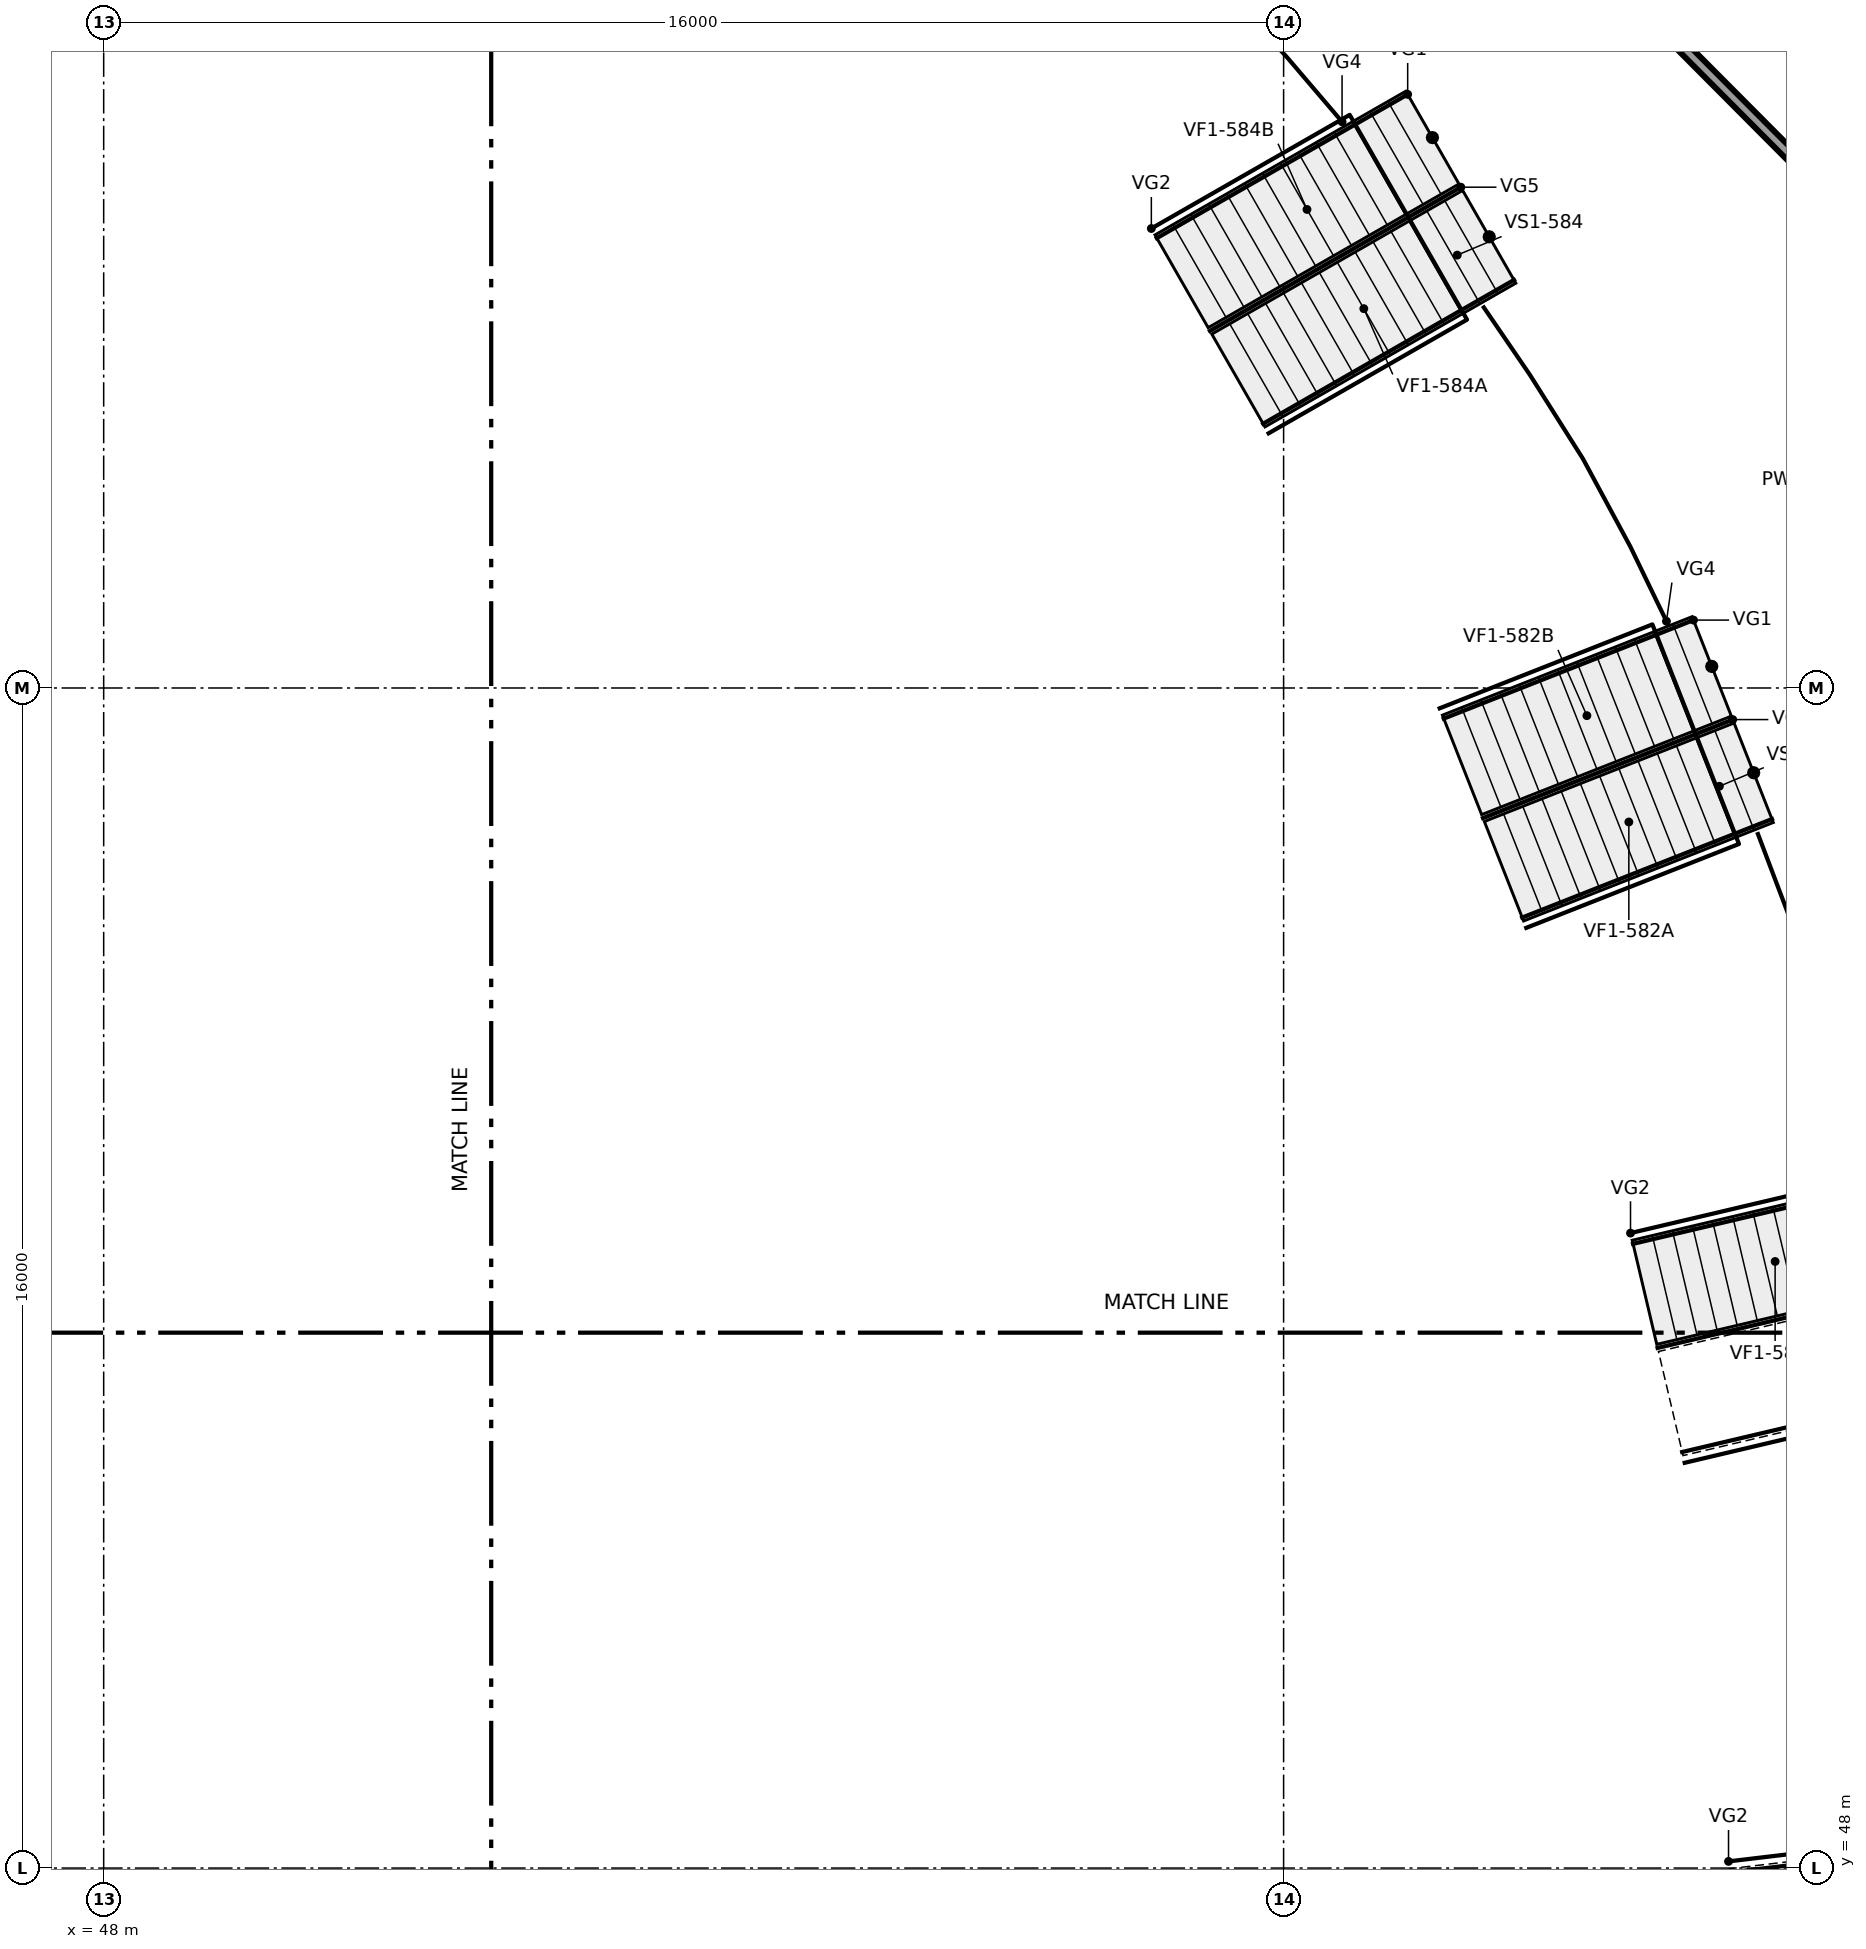
"""IFC4 building model, lengths in metres.
Left out: names, types, materials, properties, quantities, classifications, styles, units other than length and angle.
Written with IfcOpenShell. Run it as: python <this file> out.ifc"""

import sys

from ifc_helpers import new_model, si_unit, direction, frame, frame_2d, origin, origin_2d, place, context, subcontext, project, spatial, rectangle, circle, extrude, element, save


model = new_model("IFC4")
c1 = context("Model", 3, precision=1e-05, world=origin(), true_north=direction((0.0, 1.0)))
c2 = subcontext(c1, "Body", "Model", "MODEL_VIEW")
j1 = project(units=[si_unit("LENGTHUNIT", "METRE"), si_unit("PLANEANGLEUNIT", "RADIAN")], contexts=[c1])
p1 = place(None, origin())
s1 = spatial("IfcSite", under=j1, at=p1, CompositionType="ELEMENT")
p2 = place(p1, origin())
s2 = spatial("IfcBuilding", under=s1, at=p2, CompositionType="ELEMENT")
p3 = place(p2, frame((0.0, 0.0, 18.0)))
s3 = spatial("IfcBuildingStorey", under=s2, at=p3, CompositionType="ELEMENT", Elevation=18.0)
p4 = place(p3, frame((71.17, 59.677, 0.0), z_axis=(0.0, 0.0, 1.0), x_axis=(1.0, 0.0, 0.0)))
e1 = element("IfcColumn", 1, at=p4, inside=s3, PredefinedType="COLUMN", context=c2, shape_type="SweptSolid", body=[
    extrude(circle(Radius=0.45, at=origin_2d()), origin(), (0.0, 0.0, 1.0), 3.698),
])
p5 = place(p3, frame((67.972, 67.058, 0.0), z_axis=(0.0, 0.0, 1.0), x_axis=(1.0, 0.0, 0.0)))
e2 = element("IfcColumn", 2, at=p5, inside=s3, PredefinedType="COLUMN", context=c2, shape_type="SweptSolid", body=[
    extrude(circle(Radius=0.45, at=origin_2d()), origin(), (0.0, 0.0, 1.0), 3.954),
])
p6 = place(p3, frame((64.152, 77.974, 0.0), z_axis=(0.0, 0.0, 1.0), x_axis=(0.705496399325, -0.70871350385, 0.0)))
e3 = element("IfcWall", 3, at=p6, inside=s3, PredefinedType="PARTITIONING", context=c2, shape_type="SweptSolid", body=[
    extrude(rectangle(XDim=13.356, YDim=0.15, at=frame_2d((6.678, 0.0))), origin(), (0.0, 0.0, 1.0), 5.6),
])
p7 = place(p6, frame((4.85, 0.0, 0.0)))
e4 = element("IfcOpeningElement", 4, at=p7, cuts=e3, PredefinedType="OPENING", context=c2, shape_type="SweptSolid", body=[
    extrude(rectangle(XDim=1.8, YDim=2.1, at=frame_2d((0.9, 1.05))), frame((0.0, 0.085, 0.0), z_axis=(0.0, -1.0, 0.0), x_axis=(1.0, 0.0, 0.0)), (0.0, 0.0, 1.0), 0.17),
])
p8 = place(p6, frame((11.45, 0.0, 0.0)))
e5 = element("IfcOpeningElement", 5, at=p8, cuts=e3, PredefinedType="OPENING", context=c2, shape_type="SweptSolid", body=[
    extrude(rectangle(XDim=1.8, YDim=2.1, at=frame_2d((0.9, 1.05))), frame((0.0, 0.085, 0.0), z_axis=(0.0, -1.0, 0.0), x_axis=(1.0, 0.0, 0.0)), (0.0, 0.0, 1.0), 0.17),
])
save(model, sys.argv[1])
